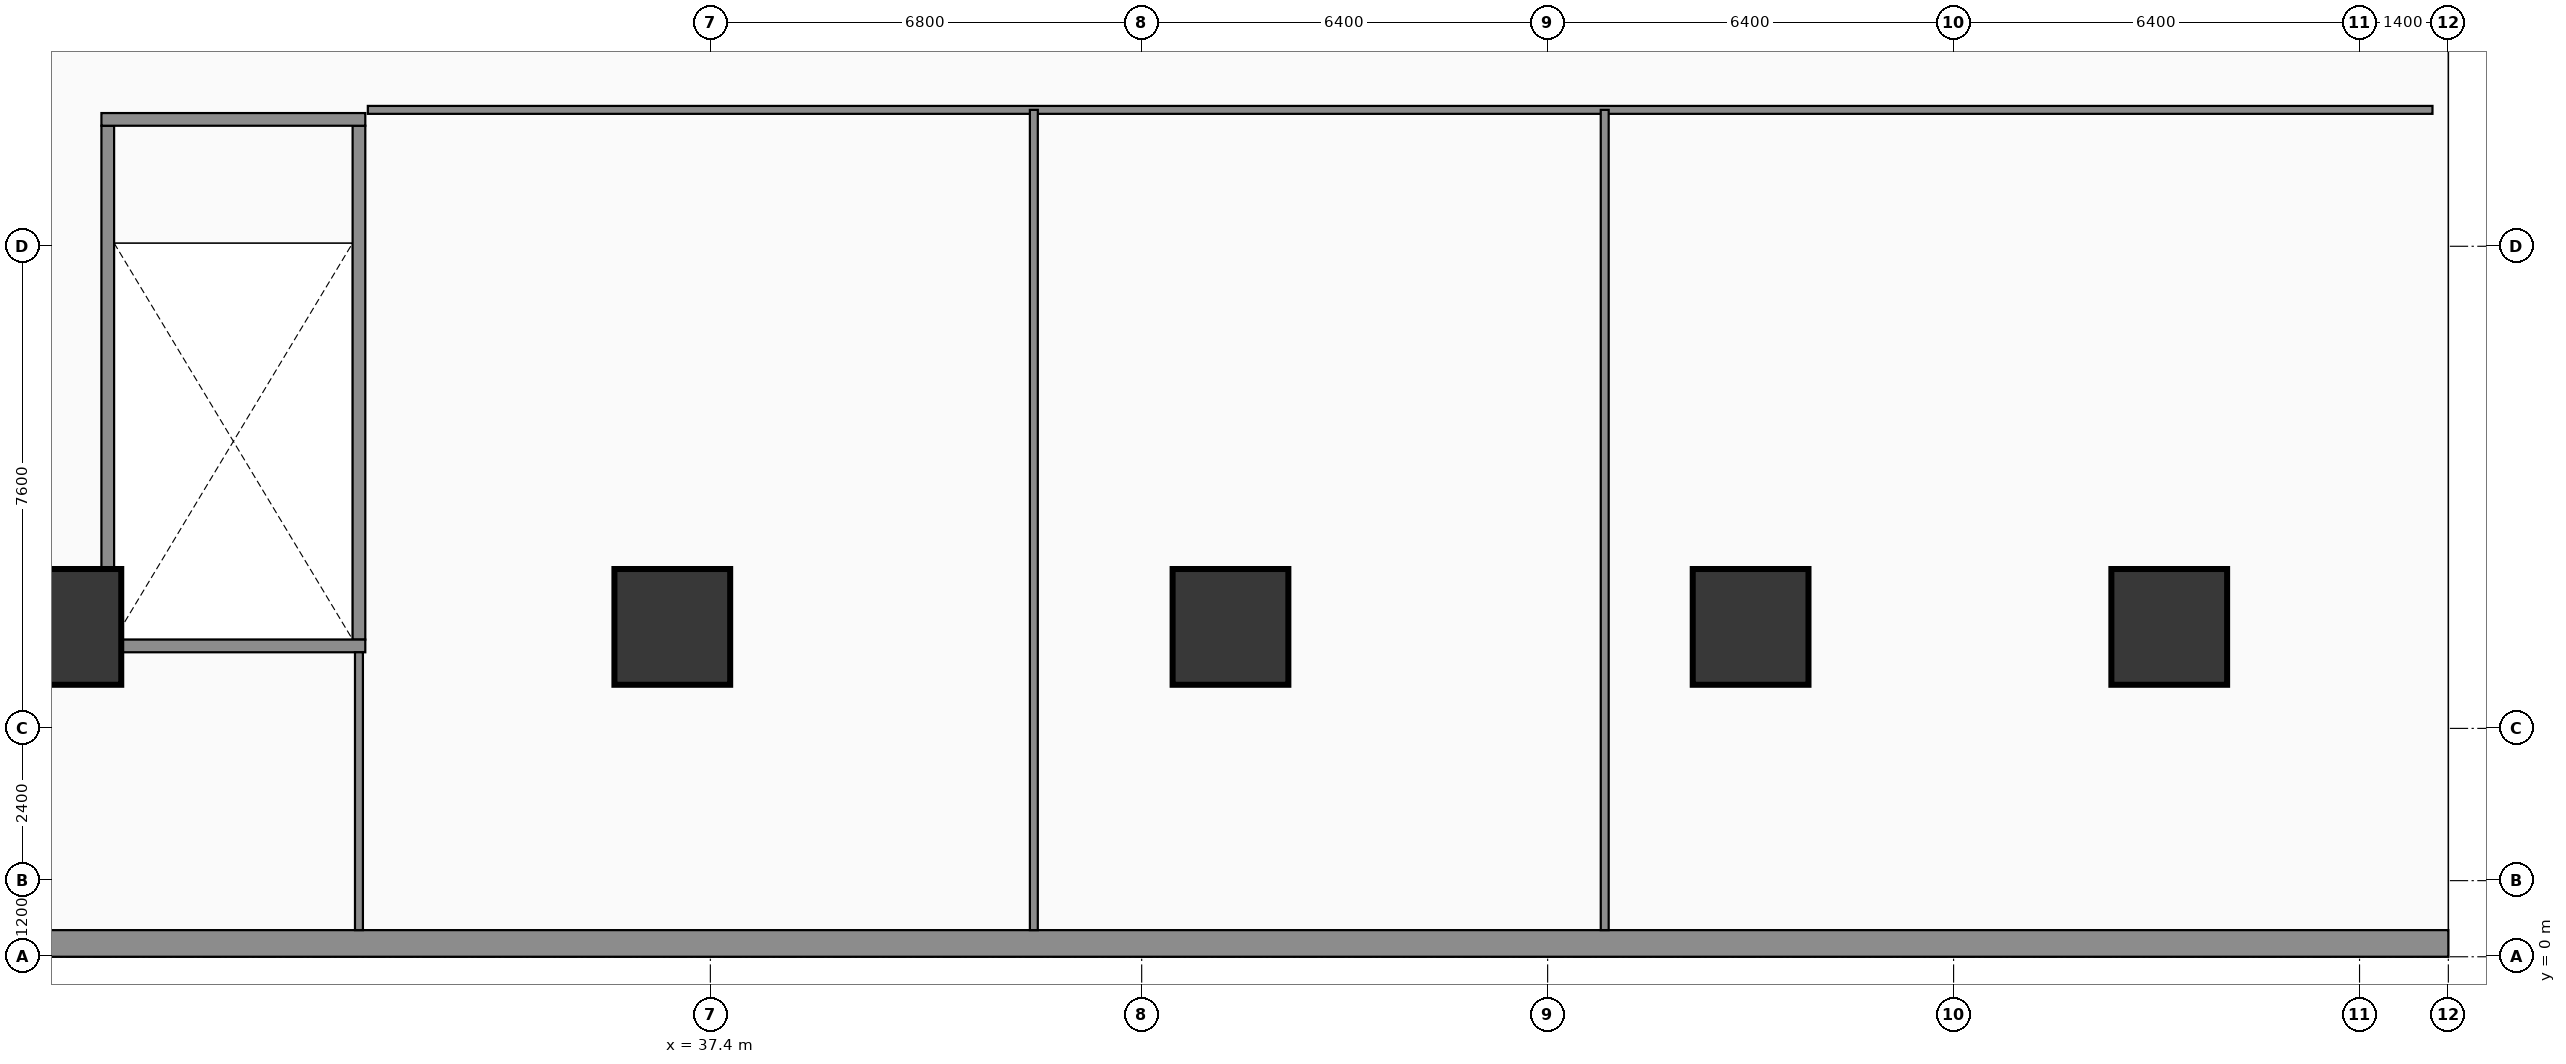
"""IFC4 building model, lengths in metres.
Left out: names, types, materials, properties, quantities, classifications, styles, units other than length and angle.
Written with IfcOpenShell. Run it as: python <this file> out.ifc"""

import sys

from ifc_helpers import new_model, si_unit, direction, frame, frame_2d, origin, origin_2d, place, context, subcontext, project, spatial, rectangle, extrude, element, fill, save


model = new_model("IFC4")
c1 = context("Model", 3, precision=1e-05, world=origin(), true_north=direction((0.0, 1.0)))
c2 = subcontext(c1, "Body", "Model", "MODEL_VIEW")
j1 = project(units=[si_unit("LENGTHUNIT", "METRE"), si_unit("PLANEANGLEUNIT", "RADIAN")], contexts=[c1])
p1 = place(None, origin())
s1 = spatial("IfcSite", under=j1, at=p1, CompositionType="ELEMENT")
p2 = place(p1, origin())
s2 = spatial("IfcBuilding", under=s1, at=p2, CompositionType="ELEMENT")
p3 = place(p2, frame((0.0, 0.0, 15.2)))
s3 = spatial("IfcBuildingStorey", under=s2, at=p3, CompositionType="ELEMENT", Elevation=15.2)
for number, where, z_axis, x_axis in (
    (1, (27.2, 5.2, 0.0), (0.0, 0.0, 1.0), (1.0, 0.0, 0.0)),
    (2, (36.8, 5.2, 0.0), (0.0, 0.0, 1.0), (1.0, 0.0, 0.0)),
    (3, (45.6, 5.2, 0.0), (0.0, 0.0, 1.0), (1.0, 0.0, 0.0)),
    (4, (53.8, 5.2, 0.0), (0.0, 0.0, 1.0), (1.0, 0.0, 0.0)),
    (5, (60.4, 5.2, 0.0), (0.0, 0.0, 1.0), (1.0, 0.0, 0.0)),
):
    element("IfcColumn", number, at=place(p3, frame(where, z_axis=z_axis, x_axis=x_axis)), inside=s3, PredefinedType="COLUMN", context=c2, shape_type="SweptSolid", body=[
        extrude(rectangle(XDim=1.8, YDim=1.8, at=origin_2d()), origin(), (0.0, 0.0, 1.0), 4.46),
    ])
p4 = place(p3, frame((0.0, 0.21, 0.0), z_axis=(0.0, 0.0, 1.0), x_axis=(1.0, 0.0, 0.0)))
e6 = element("IfcWall", 6, at=p4, inside=s3, PredefinedType="SOLIDWALL", context=c2, shape_type="SweptSolid", body=[
    extrude(rectangle(XDim=64.8, YDim=0.42, at=frame_2d((32.4, 0.0))), origin(), (0.0, 0.0, 1.0), 4.46),
])
p5 = place(p4, frame((8.0, 0.0, 0.95)))
e7 = element("IfcOpeningElement", 7, at=p5, cuts=e6, PredefinedType="OPENING", context=c2, shape_type="SweptSolid", body=[
    extrude(rectangle(XDim=2.4, YDim=2.1, at=frame_2d((1.2, 1.05))), frame((0.0, 0.22, 0.0), z_axis=(0.0, -1.0, 0.0), x_axis=(1.0, 0.0, 0.0)), (0.0, 0.0, 1.0), 0.44),
])
p6 = place(p4, frame((16.0, 0.0, 0.95)))
e8 = element("IfcOpeningElement", 8, at=p6, cuts=e6, PredefinedType="OPENING", context=c2, shape_type="SweptSolid", body=[
    extrude(rectangle(XDim=2.4, YDim=2.1, at=frame_2d((1.2, 1.05))), frame((0.0, 0.22, 0.0), z_axis=(0.0, -1.0, 0.0), x_axis=(1.0, 0.0, 0.0)), (0.0, 0.0, 1.0), 0.44),
])
p7 = place(p4, frame((24.0, 0.0, 0.95)))
e9 = element("IfcOpeningElement", 9, at=p7, cuts=e6, PredefinedType="OPENING", context=c2, shape_type="SweptSolid", body=[
    extrude(rectangle(XDim=2.4, YDim=2.1, at=frame_2d((1.2, 1.05))), frame((0.0, 0.22, 0.0), z_axis=(0.0, -1.0, 0.0), x_axis=(1.0, 0.0, 0.0)), (0.0, 0.0, 1.0), 0.44),
])
p8 = place(p4, frame((34.0, 0.0, 0.95)))
e10 = element("IfcOpeningElement", 10, at=p8, cuts=e6, PredefinedType="OPENING", context=c2, shape_type="SweptSolid", body=[
    extrude(rectangle(XDim=2.4, YDim=2.1, at=frame_2d((1.2, 1.05))), frame((0.0, 0.22, 0.0), z_axis=(0.0, -1.0, 0.0), x_axis=(1.0, 0.0, 0.0)), (0.0, 0.0, 1.0), 0.44),
])
p9 = place(p4, frame((44.5, 0.0, 0.95)))
e11 = element("IfcOpeningElement", 11, at=p9, cuts=e6, PredefinedType="OPENING", context=c2, shape_type="SweptSolid", body=[
    extrude(rectangle(XDim=2.4, YDim=2.1, at=frame_2d((1.2, 1.05))), frame((0.0, 0.22, 0.0), z_axis=(0.0, -1.0, 0.0), x_axis=(1.0, 0.0, 0.0)), (0.0, 0.0, 1.0), 0.44),
])
p10 = place(p4, frame((58.0, 0.0, 0.95)))
e12 = element("IfcOpeningElement", 12, at=p10, cuts=e6, PredefinedType="OPENING", context=c2, shape_type="SweptSolid", body=[
    extrude(rectangle(XDim=2.4, YDim=2.1, at=frame_2d((1.2, 1.05))), frame((0.0, 0.22, 0.0), z_axis=(0.0, -1.0, 0.0), x_axis=(1.0, 0.0, 0.0)), (0.0, 0.0, 1.0), 0.44),
])
for number, where, z_axis, x_axis in (
    (13, (27.9, 5.0, 0.0), (0.0, 0.0, 1.0), (0.0, 1.0, 0.0)),
    (14, (31.86, 5.0, 0.0), (0.0, 0.0, 1.0), (0.0, 1.0, 0.0)),
):
    element("IfcWall", number, at=place(p3, frame(where, z_axis=z_axis, x_axis=x_axis)), inside=s3, PredefinedType="SHEAR", context=c2, shape_type="SweptSolid", body=[
        extrude(rectangle(XDim=8.1, YDim=0.2, at=frame_2d((4.05, 0.0))), origin(), (0.0, 0.0, 1.0), 4.46),
    ])
p11 = place(p3, frame((27.8, 4.9, 0.0), z_axis=(0.0, 0.0, 1.0), x_axis=(1.0, 0.0, 0.0)))
e15 = element("IfcWall", 15, at=p11, inside=s3, PredefinedType="SHEAR", context=c2, shape_type="SweptSolid", body=[
    extrude(rectangle(XDim=4.16, YDim=0.2, at=frame_2d((2.08, 0.0))), origin(), (0.0, 0.0, 1.0), 4.46),
])
p12 = place(p3, frame((27.8, 13.2, 0.0), z_axis=(0.0, 0.0, 1.0), x_axis=(1.0, 0.0, 0.0)))
e16 = element("IfcWall", 16, at=p12, inside=s3, PredefinedType="SHEAR", context=c2, shape_type="SweptSolid", body=[
    extrude(rectangle(XDim=4.16, YDim=0.2, at=frame_2d((2.08, 0.0))), origin(), (0.0, 0.0, 1.0), 4.46),
])
p13 = place(p12, frame((1.53, 0.0, 0.0)))
e17 = element("IfcOpeningElement", 17, at=p13, cuts=e16, PredefinedType="OPENING", context=c2, shape_type="SweptSolid", body=[
    extrude(rectangle(XDim=1.1, YDim=2.2, at=frame_2d((0.55, 1.1))), frame((0.0, 0.11, 0.0), z_axis=(0.0, -1.0, 0.0), x_axis=(1.0, 0.0, 0.0)), (0.0, 0.0, 1.0), 0.22),
])
p14 = place(p3, frame((32.0, 13.35, 0.0), z_axis=(0.0, 0.0, 1.0), x_axis=(1.0, 0.0, 0.0)))
e18 = element("IfcWall", 18, at=p14, inside=s3, PredefinedType="PARTITIONING", context=c2, shape_type="SweptSolid", body=[
    extrude(rectangle(XDim=32.55, YDim=0.125, at=frame_2d((16.275, 0.0))), origin(), (0.0, 0.0, 1.0), 3.96),
])
p15 = place(p14, frame((4.7, 0.0, 0.0)))
e19 = element("IfcOpeningElement", 19, at=p15, cuts=e18, PredefinedType="OPENING", context=c2, shape_type="SweptSolid", body=[
    extrude(rectangle(XDim=1.1, YDim=2.2, at=frame_2d((0.55, 1.1))), frame((0.0, 0.073, 0.0), z_axis=(0.0, -1.0, 0.0), x_axis=(1.0, 0.0, 0.0)), (0.0, 0.0, 1.0), 0.145),
])
p16 = place(p14, frame((14.379, 0.0, 0.0)))
e20 = element("IfcOpeningElement", 20, at=p16, cuts=e18, PredefinedType="OPENING", context=c2, shape_type="SweptSolid", body=[
    extrude(rectangle(XDim=1.1, YDim=2.2, at=frame_2d((0.55, 1.1))), frame((0.0, 0.073, 0.0), z_axis=(0.0, -1.0, 0.0), x_axis=(1.0, 0.0, 0.0)), (0.0, 0.0, 1.0), 0.145),
])
p17 = place(p14, frame((21.375, 0.0, 0.0)))
e21 = element("IfcOpeningElement", 21, at=p17, cuts=e18, PredefinedType="OPENING", context=c2, shape_type="SweptSolid", body=[
    extrude(rectangle(XDim=0.95, YDim=2.15, at=frame_2d((0.475, 1.075))), frame((0.0, 0.073, 0.0), z_axis=(0.0, -1.0, 0.0), x_axis=(1.0, 0.0, 0.0)), (0.0, 0.0, 1.0), 0.145),
])
p18 = place(p3, frame((31.86, 0.42, 0.0), z_axis=(0.0, 0.0, 1.0), x_axis=(0.0, 1.0, 0.0)))
e22 = element("IfcWall", 22, at=p18, inside=s3, PredefinedType="PARTITIONING", context=c2, shape_type="SweptSolid", body=[
    extrude(rectangle(XDim=4.38, YDim=0.125, at=frame_2d((2.19, 0.0))), origin(), (0.0, 0.0, 1.0), 4.46),
])
for number, where, z_axis, x_axis in (
    (23, (42.5, 0.42, 0.0), (0.0, 0.0, 1.0), (0.0, 1.0, 0.0)),
    (24, (51.5, 0.42, 0.0), (0.0, 0.0, 1.0), (0.0, 1.0, 0.0)),
):
    element("IfcWall", number, at=place(p3, frame(where, z_axis=z_axis, x_axis=x_axis)), inside=s3, PredefinedType="PARTITIONING", context=c2, shape_type="SweptSolid", body=[
        extrude(rectangle(XDim=12.93, YDim=0.125, at=frame_2d((6.465, 0.0))), origin(), (0.0, 0.0, 1.0), 4.46),
    ])
p19 = place(p8, origin())
e25 = element("IfcWindow", 25, at=p19, inside=s3, PartitioningType="SINGLE_PANEL", PredefinedType="WINDOW", context=c2, shape_type="SweptSolid", body=[
    extrude(rectangle(XDim=2.4, YDim=2.1, at=frame_2d((1.2, 1.05))), frame((0.0, 0.03, 0.0), z_axis=(0.0, -1.0, 0.0), x_axis=(1.0, 0.0, 0.0)), (0.0, 0.0, 1.0), 0.06),
])
fill(e10, e25)
p20 = place(p9, origin())
e26 = element("IfcWindow", 26, at=p20, inside=s3, PartitioningType="SINGLE_PANEL", PredefinedType="WINDOW", context=c2, shape_type="SweptSolid", body=[
    extrude(rectangle(XDim=2.4, YDim=2.1, at=frame_2d((1.2, 1.05))), frame((0.0, 0.03, 0.0), z_axis=(0.0, -1.0, 0.0), x_axis=(1.0, 0.0, 0.0)), (0.0, 0.0, 1.0), 0.06),
])
fill(e11, e26)
p21 = place(p10, origin())
e27 = element("IfcWindow", 27, at=p21, inside=s3, PartitioningType="SINGLE_PANEL", PredefinedType="WINDOW", context=c2, shape_type="SweptSolid", body=[
    extrude(rectangle(XDim=2.4, YDim=2.1, at=frame_2d((1.2, 1.05))), frame((0.0, 0.03, 0.0), z_axis=(0.0, -1.0, 0.0), x_axis=(1.0, 0.0, 0.0)), (0.0, 0.0, 1.0), 0.06),
])
fill(e12, e27)
p22 = place(p13, frame((1.1, 0.0, 0.0), z_axis=(0.0, 0.0, 1.0), x_axis=(-1.0, 0.0, 0.0)))
e28 = element("IfcDoor", 28, at=p22, inside=s3, OperationType="SINGLE_SWING_RIGHT", PredefinedType="DOOR", context=c2, shape_type="SweptSolid", body=[
    extrude(rectangle(XDim=1.1, YDim=2.2, at=frame_2d((0.55, 1.1))), frame((0.0, 0.025, 0.0), z_axis=(0.0, -1.0, 0.0), x_axis=(1.0, 0.0, 0.0)), (0.0, 0.0, 1.0), 0.05),
])
fill(e17, e28)
p23 = place(p15, origin())
e29 = element("IfcDoor", 29, at=p23, inside=s3, OperationType="SINGLE_SWING_LEFT", PredefinedType="DOOR", context=c2, shape_type="SweptSolid", body=[
    extrude(rectangle(XDim=1.1, YDim=2.2, at=frame_2d((0.55, 1.1))), frame((0.0, 0.025, 0.0), z_axis=(0.0, -1.0, 0.0), x_axis=(1.0, 0.0, 0.0)), (0.0, 0.0, 1.0), 0.05),
])
fill(e19, e29)
p24 = place(p16, origin())
e30 = element("IfcDoor", 30, at=p24, inside=s3, OperationType="SINGLE_SWING_RIGHT", PredefinedType="DOOR", context=c2, shape_type="SweptSolid", body=[
    extrude(rectangle(XDim=1.1, YDim=2.2, at=frame_2d((0.55, 1.1))), frame((0.0, 0.025, 0.0), z_axis=(0.0, -1.0, 0.0), x_axis=(1.0, 0.0, 0.0)), (0.0, 0.0, 1.0), 0.05),
])
fill(e20, e30)
p25 = place(p17, origin())
e31 = element("IfcDoor", 31, at=p25, inside=s3, OperationType="SINGLE_SWING_LEFT", PredefinedType="DOOR", context=c2, shape_type="SweptSolid", body=[
    extrude(rectangle(XDim=0.95, YDim=2.15, at=frame_2d((0.475, 1.075))), frame((0.0, 0.025, 0.0), z_axis=(0.0, -1.0, 0.0), x_axis=(1.0, 0.0, 0.0)), (0.0, 0.0, 1.0), 0.05),
])
fill(e21, e31)
save(model, sys.argv[1])
